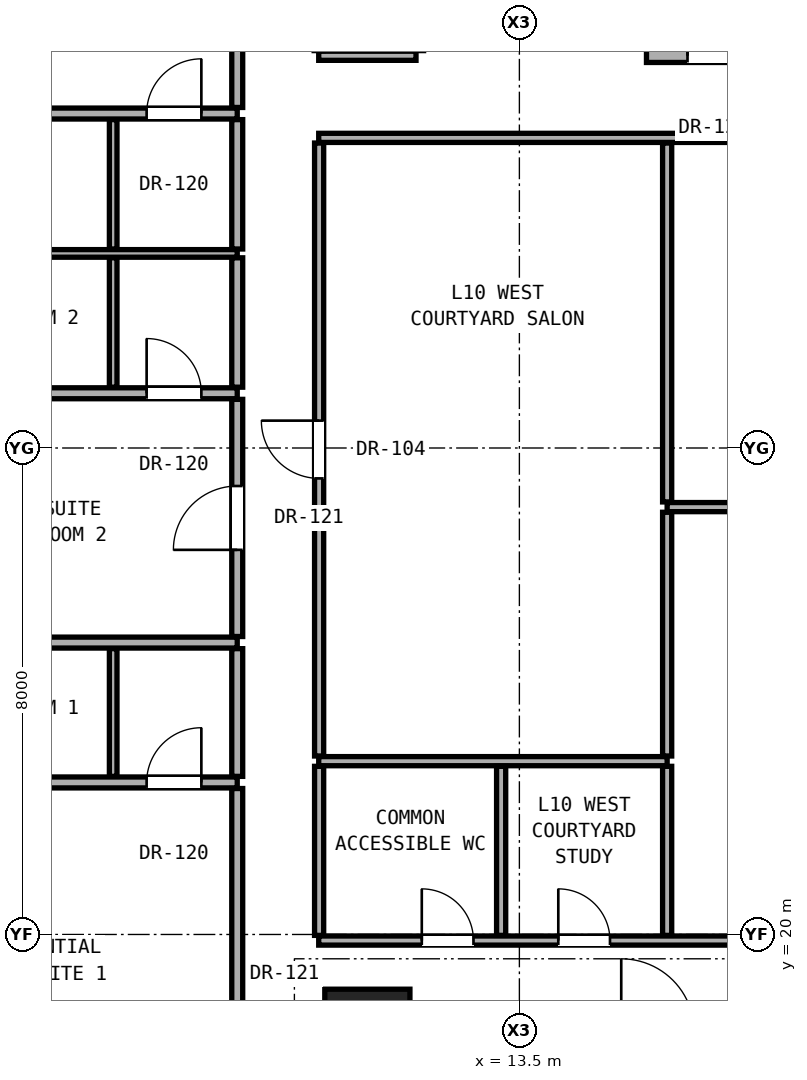
"""IFC4 building model, lengths in metres.
Left out: names, types, materials, properties, quantities, classifications, styles, units other than length and angle.
Written with IfcOpenShell. Run it as: python <this file> out.ifc"""

import sys

from ifc_helpers import new_model, si_unit, direction, frame, frame_2d, origin, origin_2d, place, context, subcontext, project, spatial, rectangle, extrude, element, fill, save


model = new_model("IFC4")
c1 = context("Model", 3, precision=1e-05, world=origin(), true_north=direction((0.0, 1.0)))
c2 = subcontext(c1, "Body", "Model", "MODEL_VIEW")
j1 = project(units=[si_unit("LENGTHUNIT", "METRE"), si_unit("PLANEANGLEUNIT", "RADIAN")], contexts=[c1])
p1 = place(None, origin())
s1 = spatial("IfcSite", under=j1, at=p1, CompositionType="ELEMENT")
p2 = place(p1, origin())
s2 = spatial("IfcBuilding", under=s1, at=p2, CompositionType="ELEMENT")
p3 = place(p2, frame((0.0, 0.0, 38.9)))
s3 = spatial("IfcBuildingStorey", under=s2, at=p3, CompositionType="ELEMENT", Elevation=38.9)
p4 = place(p3, frame((11.0, 18.4, 0.0), z_axis=(0.0, 0.0, 1.0), x_axis=(1.0, 0.0, 0.0)))
e1 = element("IfcColumn", 1, at=p4, inside=s3, PredefinedType="COLUMN", context=c2, shape_type="SweptSolid", body=[
    extrude(rectangle(XDim=1.4, YDim=1.4, at=origin_2d()), origin(), (0.0, 0.0, 1.0), 3.3),
])
p5 = place(p3, frame((10.2, 19.9, 0.0), z_axis=(0.0, 0.0, 1.0), x_axis=(1.0, 0.0, 0.0)))
e2 = element("IfcWall", 2, at=p5, inside=s3, PredefinedType="PARTITIONING", context=c2, shape_type="SweptSolid", body=[
    extrude(rectangle(XDim=20.6, YDim=0.15, at=frame_2d((10.3, 0.0))), origin(), (0.0, 0.0, 1.0), 2.104),
])
p6 = place(p5, frame((1.695, 0.0, 0.0)))
e3 = element("IfcOpeningElement", 3, at=p6, cuts=e2, PredefinedType="OPENING", context=c2, shape_type="SweptSolid", body=[
    extrude(rectangle(XDim=0.85, YDim=2.01, at=frame_2d((0.425, 1.005))), frame((0.0, 0.085, 0.0), z_axis=(0.0, -1.0, 0.0), x_axis=(1.0, 0.0, 0.0)), (0.0, 0.0, 1.0), 0.17),
])
p7 = place(p5, frame((3.94, 0.0, 0.0)))
e4 = element("IfcOpeningElement", 4, at=p7, cuts=e2, PredefinedType="OPENING", context=c2, shape_type="SweptSolid", body=[
    extrude(rectangle(XDim=0.85, YDim=2.01, at=frame_2d((0.425, 1.005))), frame((0.0, 0.085, 0.0), z_axis=(0.0, -1.0, 0.0), x_axis=(1.0, 0.0, 0.0)), (0.0, 0.0, 1.0), 0.17),
])
p8 = place(p5, frame((12.72, 0.0, 0.0)))
e5 = element("IfcOpeningElement", 5, at=p8, cuts=e2, PredefinedType="OPENING", context=c2, shape_type="SweptSolid", body=[
    extrude(rectangle(XDim=0.85, YDim=2.01, at=frame_2d((0.425, 1.005))), frame((0.0, 0.085, 0.0), z_axis=(0.0, -1.0, 0.0), x_axis=(1.0, 0.0, 0.0)), (0.0, 0.0, 1.0), 0.17),
])
p9 = place(p3, frame((-1.88, 22.5, 0.0), z_axis=(0.0, 0.0, 1.0), x_axis=(1.0, 0.0, 0.0)))
e6 = element("IfcWall", 6, at=p9, inside=s3, PredefinedType="PARTITIONING", context=c2, shape_type="SweptSolid", body=[
    extrude(rectangle(XDim=10.74, YDim=0.18, at=frame_2d((5.37, 0.0))), origin(), (0.0, 0.0, 1.0), 2.125),
])
p10 = place(p9, frame((3.945, 0.0, 0.0)))
e7 = element("IfcOpeningElement", 7, at=p10, cuts=e6, PredefinedType="OPENING", context=c2, shape_type="SweptSolid", body=[
    extrude(rectangle(XDim=0.85, YDim=2.01, at=frame_2d((0.425, 1.005))), frame((0.0, 0.1, 0.0), z_axis=(0.0, -1.0, 0.0), x_axis=(1.0, 0.0, 0.0)), (0.0, 0.0, 1.0), 0.2),
])
p11 = place(p9, frame((9.25, 0.0, 0.0)))
e8 = element("IfcOpeningElement", 8, at=p11, cuts=e6, PredefinedType="OPENING", context=c2, shape_type="SweptSolid", body=[
    extrude(rectangle(XDim=0.9, YDim=2.1, at=frame_2d((0.45, 1.05))), frame((0.0, 0.1, 0.0), z_axis=(0.0, -1.0, 0.0), x_axis=(1.0, 0.0, 0.0)), (0.0, 0.0, 1.0), 0.2),
])
p12 = place(p3, frame((10.2, 22.85, 0.0), z_axis=(0.0, 0.0, 1.0), x_axis=(1.0, 0.0, 0.0)))
e9 = element("IfcWall", 9, at=p12, inside=s3, PredefinedType="PARTITIONING", context=c2, shape_type="SweptSolid", body=[
    extrude(rectangle(XDim=5.73, YDim=0.15, at=frame_2d((2.865, 0.0))), origin(), (0.0, 0.0, 1.0), 2.104),
])
p13 = place(p3, frame((-1.88, 24.8, 0.0), z_axis=(0.0, 0.0, 1.0), x_axis=(1.0, 0.0, 0.0)))
e10 = element("IfcWall", 10, at=p13, inside=s3, PredefinedType="PARTITIONING", context=c2, shape_type="SweptSolid", body=[
    extrude(rectangle(XDim=10.74, YDim=0.18, at=frame_2d((5.37, 0.0))), origin(), (0.0, 0.0, 1.0), 2.125),
])
p14 = place(p3, frame((15.93, 27.028, 0.0), z_axis=(0.0, 0.0, 1.0), x_axis=(1.0, 0.0, 0.0)))
e11 = element("IfcWall", 11, at=p14, inside=s3, PredefinedType="PARTITIONING", context=c2, shape_type="SweptSolid", body=[
    extrude(rectangle(XDim=14.87, YDim=0.15, at=frame_2d((7.435, 0.0))), origin(), (0.0, 0.0, 1.0), 2.104),
])
p15 = place(p3, frame((-1.88, 28.9, 0.0), z_axis=(0.0, 0.0, 1.0), x_axis=(1.0, 0.0, 0.0)))
e12 = element("IfcWall", 12, at=p15, inside=s3, PredefinedType="PARTITIONING", context=c2, shape_type="SweptSolid", body=[
    extrude(rectangle(XDim=10.74, YDim=0.18, at=frame_2d((5.37, 0.0))), origin(), (0.0, 0.0, 1.0), 2.125),
])
p16 = place(p15, frame((3.945, 0.0, 0.0)))
e13 = element("IfcOpeningElement", 13, at=p16, cuts=e12, PredefinedType="OPENING", context=c2, shape_type="SweptSolid", body=[
    extrude(rectangle(XDim=0.85, YDim=2.01, at=frame_2d((0.425, 1.005))), frame((0.0, 0.1, 0.0), z_axis=(0.0, -1.0, 0.0), x_axis=(1.0, 0.0, 0.0)), (0.0, 0.0, 1.0), 0.2),
])
p17 = place(p15, frame((9.25, 0.0, 0.0)))
e14 = element("IfcOpeningElement", 14, at=p17, cuts=e12, PredefinedType="OPENING", context=c2, shape_type="SweptSolid", body=[
    extrude(rectangle(XDim=0.9, YDim=2.1, at=frame_2d((0.45, 1.05))), frame((0.0, 0.1, 0.0), z_axis=(0.0, -1.0, 0.0), x_axis=(1.0, 0.0, 0.0)), (0.0, 0.0, 1.0), 0.2),
])
p18 = place(p3, frame((-1.88, 31.2, 0.0), z_axis=(0.0, 0.0, 1.0), x_axis=(1.0, 0.0, 0.0)))
e15 = element("IfcWall", 15, at=p18, inside=s3, PredefinedType="PARTITIONING", context=c2, shape_type="SweptSolid", body=[
    extrude(rectangle(XDim=10.74, YDim=0.125, at=frame_2d((5.37, 0.0))), origin(), (0.0, 0.0, 1.0), 2.125),
])
p19 = place(p3, frame((10.2, 33.1, 0.0), z_axis=(0.0, 0.0, 1.0), x_axis=(1.0, 0.0, 0.0)))
e16 = element("IfcWall", 16, at=p19, inside=s3, PredefinedType="PARTITIONING", context=c2, shape_type="SweptSolid", body=[
    extrude(rectangle(XDim=20.6, YDim=0.15, at=frame_2d((10.3, 0.0))), origin(), (0.0, 0.0, 1.0), 2.104),
])
p20 = place(p19, frame((12.72, 0.0, 0.0)))
e17 = element("IfcOpeningElement", 17, at=p20, cuts=e16, PredefinedType="OPENING", context=c2, shape_type="SweptSolid", body=[
    extrude(rectangle(XDim=0.85, YDim=2.01, at=frame_2d((0.425, 1.005))), frame((0.0, 0.085, 0.0), z_axis=(0.0, -1.0, 0.0), x_axis=(1.0, 0.0, 0.0)), (0.0, 0.0, 1.0), 0.17),
])
p21 = place(p3, frame((-1.88, 33.5, 0.0), z_axis=(0.0, 0.0, 1.0), x_axis=(1.0, 0.0, 0.0)))
e18 = element("IfcWall", 18, at=p21, inside=s3, PredefinedType="PARTITIONING", context=c2, shape_type="SweptSolid", body=[
    extrude(rectangle(XDim=10.74, YDim=0.18, at=frame_2d((5.37, 0.0))), origin(), (0.0, 0.0, 1.0), 2.125),
])
p22 = place(p21, frame((3.945, 0.0, 0.0)))
e19 = element("IfcOpeningElement", 19, at=p22, cuts=e18, PredefinedType="OPENING", context=c2, shape_type="SweptSolid", body=[
    extrude(rectangle(XDim=0.85, YDim=2.01, at=frame_2d((0.425, 1.005))), frame((0.0, 0.1, 0.0), z_axis=(0.0, -1.0, 0.0), x_axis=(1.0, 0.0, 0.0)), (0.0, 0.0, 1.0), 0.2),
])
p23 = place(p21, frame((9.25, 0.0, 0.0)))
e20 = element("IfcOpeningElement", 20, at=p23, cuts=e18, PredefinedType="OPENING", context=c2, shape_type="SweptSolid", body=[
    extrude(rectangle(XDim=0.9, YDim=2.1, at=frame_2d((0.45, 1.05))), frame((0.0, 0.1, 0.0), z_axis=(0.0, -1.0, 0.0), x_axis=(1.0, 0.0, 0.0)), (0.0, 0.0, 1.0), 0.2),
])
p24 = place(p3, frame((10.2, 34.45, 0.0), z_axis=(0.0, 0.0, 1.0), x_axis=(1.0, 0.0, 0.0)))
e21 = element("IfcWall", 21, at=p24, inside=s3, PredefinedType="PARTITIONING", context=c2, shape_type="SweptSolid", body=[
    extrude(rectangle(XDim=1.6, YDim=0.15, at=frame_2d((0.8, 0.0))), origin(), (0.0, 0.0, 1.0), 2.104),
])
p25 = place(p3, frame((15.59, 34.45, 0.0), z_axis=(0.0, 0.0, 1.0), x_axis=(1.0, 0.0, 0.0)))
e22 = element("IfcWall", 22, at=p25, inside=s3, PredefinedType="SOLIDWALL", context=c2, shape_type="SweptSolid", body=[
    extrude(rectangle(XDim=15.21, YDim=0.22, at=frame_2d((7.605, 0.0))), origin(), (0.0, 0.0, 1.0), 2.104),
])
p26 = place(p25, frame((6.435, 0.0, 0.0)))
e23 = element("IfcOpeningElement", 23, at=p26, cuts=e22, PredefinedType="OPENING", context=c2, shape_type="SweptSolid", body=[
    extrude(rectangle(XDim=0.85, YDim=2.01, at=frame_2d((0.425, 1.005))), frame((0.0, 0.12, 0.0), z_axis=(0.0, -1.0, 0.0), x_axis=(1.0, 0.0, 0.0)), (0.0, 0.0, 1.0), 0.24),
])
p27 = place(p25, frame((11.135, 0.0, 0.0)))
e24 = element("IfcOpeningElement", 24, at=p27, cuts=e22, PredefinedType="OPENING", context=c2, shape_type="SweptSolid", body=[
    extrude(rectangle(XDim=0.85, YDim=2.01, at=frame_2d((0.425, 1.005))), frame((0.0, 0.12, 0.0), z_axis=(0.0, -1.0, 0.0), x_axis=(1.0, 0.0, 0.0)), (0.0, 0.0, 1.0), 0.24),
])
p28 = place(p25, frame((0.675, 0.0, 0.0)))
e25 = element("IfcOpeningElement", 25, at=p28, cuts=e22, PredefinedType="OPENING", context=c2, shape_type="SweptSolid", body=[
    extrude(rectangle(XDim=0.85, YDim=2.01, at=frame_2d((0.425, 1.005))), frame((0.0, 0.12, 0.0), z_axis=(0.0, -1.0, 0.0), x_axis=(1.0, 0.0, 0.0)), (0.0, 0.0, 1.0), 0.24),
])
p29 = place(p25, frame((2.835, 0.0, 0.0)))
e26 = element("IfcOpeningElement", 26, at=p29, cuts=e22, PredefinedType="OPENING", context=c2, shape_type="SweptSolid", body=[
    extrude(rectangle(XDim=0.85, YDim=2.01, at=frame_2d((0.425, 1.005))), frame((0.0, 0.12, 0.0), z_axis=(0.0, -1.0, 0.0), x_axis=(1.0, 0.0, 0.0)), (0.0, 0.0, 1.0), 0.24),
])
p30 = place(p3, frame((6.82, 22.6, 0.0), z_axis=(0.0, 0.0, 1.0), x_axis=(0.0, 1.0, 0.0)))
e27 = element("IfcWall", 27, at=p30, inside=s3, PredefinedType="PARTITIONING", context=c2, shape_type="SweptSolid", body=[
    extrude(rectangle(XDim=2.1, YDim=0.125, at=frame_2d((1.05, 0.0))), origin(), (0.0, 0.0, 1.0), 2.279),
])
for number, where, z_axis, x_axis in (
    (28, (6.82, 29.0, 0.0), (0.0, 0.0, 1.0), (0.0, 1.0, 0.0)),
    (29, (6.82, 31.272, 0.0), (0.0, 0.0, 1.0), (0.0, 1.0, 0.0)),
):
    element("IfcWall", number, at=place(p3, frame(where, z_axis=z_axis, x_axis=x_axis)), inside=s3, PredefinedType="PARTITIONING", context=c2, shape_type="SweptSolid", body=[
        extrude(rectangle(XDim=2.127, YDim=0.125, at=frame_2d((1.064, 0.0))), origin(), (0.0, 0.0, 1.0), 2.279),
    ])
p31 = place(p3, frame((8.86, 14.01, 0.0), z_axis=(0.0, 0.0, 1.0), x_axis=(0.0, 1.0, 0.0)))
e30 = element("IfcWall", 30, at=p31, inside=s3, PredefinedType="PARTITIONING", context=c2, shape_type="SweptSolid", body=[
    extrude(rectangle(XDim=8.39, YDim=0.18, at=frame_2d((4.195, 0.0))), origin(), (0.0, 0.0, 1.0), 2.436),
])
p32 = place(p31, frame((3.67, 0.0, 0.0)))
e31 = element("IfcOpeningElement", 31, at=p32, cuts=e30, PredefinedType="OPENING", context=c2, shape_type="SweptSolid", body=[
    extrude(rectangle(XDim=1.05, YDim=2.2, at=frame_2d((0.525, 1.1))), frame((0.0, 0.1, 0.0), z_axis=(0.0, -1.0, 0.0), x_axis=(1.0, 0.0, 0.0)), (0.0, 0.0, 1.0), 0.2),
])
p33 = place(p3, frame((8.86, 22.6, 0.0), z_axis=(0.0, 0.0, 1.0), x_axis=(0.0, 1.0, 0.0)))
e32 = element("IfcWall", 32, at=p33, inside=s3, PredefinedType="PARTITIONING", context=c2, shape_type="SweptSolid", body=[
    extrude(rectangle(XDim=2.1, YDim=0.18, at=frame_2d((1.05, 0.0))), origin(), (0.0, 0.0, 1.0), 2.279),
])
p34 = place(p3, frame((8.86, 24.9, 0.0), z_axis=(0.0, 0.0, 1.0), x_axis=(0.0, 1.0, 0.0)))
e33 = element("IfcWall", 33, at=p34, inside=s3, PredefinedType="PARTITIONING", context=c2, shape_type="SweptSolid", body=[
    extrude(rectangle(XDim=3.9, YDim=0.18, at=frame_2d((1.95, 0.0))), origin(), (0.0, 0.0, 1.0), 2.279),
])
p35 = place(p34, frame((1.425, 0.0, 0.0)))
e34 = element("IfcOpeningElement", 34, at=p35, cuts=e33, PredefinedType="OPENING", context=c2, shape_type="SweptSolid", body=[
    extrude(rectangle(XDim=1.05, YDim=2.2, at=frame_2d((0.525, 1.1))), frame((0.0, 0.1, 0.0), z_axis=(0.0, -1.0, 0.0), x_axis=(1.0, 0.0, 0.0)), (0.0, 0.0, 1.0), 0.2),
])
for number, where, z_axis, x_axis in (
    (35, (8.86, 29.0, 0.0), (0.0, 0.0, 1.0), (0.0, 1.0, 0.0)),
    (36, (8.86, 31.272, 0.0), (0.0, 0.0, 1.0), (0.0, 1.0, 0.0)),
):
    element("IfcWall", number, at=place(p3, frame(where, z_axis=z_axis, x_axis=x_axis)), inside=s3, PredefinedType="PARTITIONING", context=c2, shape_type="SweptSolid", body=[
        extrude(rectangle(XDim=2.127, YDim=0.18, at=frame_2d((1.064, 0.0))), origin(), (0.0, 0.0, 1.0), 2.279),
    ])
p36 = place(p3, frame((8.86, 33.6, 0.0), z_axis=(0.0, 0.0, 1.0), x_axis=(0.0, 1.0, 0.0)))
e37 = element("IfcWall", 37, at=p36, inside=s3, PredefinedType="PARTITIONING", context=c2, shape_type="SweptSolid", body=[
    extrude(rectangle(XDim=8.39, YDim=0.18, at=frame_2d((4.195, 0.0))), origin(), (0.0, 0.0, 1.0), 2.436),
])
p37 = place(p36, frame((3.67, 0.0, 0.0)))
e38 = element("IfcOpeningElement", 38, at=p37, cuts=e37, PredefinedType="OPENING", context=c2, shape_type="SweptSolid", body=[
    extrude(rectangle(XDim=1.05, YDim=2.2, at=frame_2d((0.525, 1.1))), frame((0.0, 0.1, 0.0), z_axis=(0.0, -1.0, 0.0), x_axis=(1.0, 0.0, 0.0)), (0.0, 0.0, 1.0), 0.2),
])
p38 = place(p3, frame((10.207, 19.985, 0.0), z_axis=(0.0, 0.0, 1.0), x_axis=(0.0, 1.0, 0.0)))
e39 = element("IfcWall", 39, at=p38, inside=s3, PredefinedType="PARTITIONING", context=c2, shape_type="SweptSolid", body=[
    extrude(rectangle(XDim=2.78, YDim=0.15, at=frame_2d((1.39, 0.0))), origin(), (0.0, 0.0, 1.0), 3.06),
])
p39 = place(p3, frame((10.207, 22.935, 0.0), z_axis=(0.0, 0.0, 1.0), x_axis=(0.0, 1.0, 0.0)))
e40 = element("IfcWall", 40, at=p39, inside=s3, PredefinedType="PARTITIONING", context=c2, shape_type="SweptSolid", body=[
    extrude(rectangle(XDim=10.08, YDim=0.15, at=frame_2d((5.04, 0.0))), origin(), (0.0, 0.0, 1.0), 2.279),
])
p40 = place(p39, frame((4.565, 0.0, 0.0)))
e41 = element("IfcOpeningElement", 41, at=p40, cuts=e40, PredefinedType="OPENING", context=c2, shape_type="SweptSolid", body=[
    extrude(rectangle(XDim=0.95, YDim=2.15, at=frame_2d((0.475, 1.075))), frame((0.0, 0.085, 0.0), z_axis=(0.0, -1.0, 0.0), x_axis=(1.0, 0.0, 0.0)), (0.0, 0.0, 1.0), 0.17),
])
p41 = place(p3, frame((13.2, 19.985, 0.0), z_axis=(0.0, 0.0, 1.0), x_axis=(0.0, 1.0, 0.0)))
e42 = element("IfcWall", 42, at=p41, inside=s3, PredefinedType="PARTITIONING", context=c2, shape_type="SweptSolid", body=[
    extrude(rectangle(XDim=2.78, YDim=0.15, at=frame_2d((1.39, 0.0))), origin(), (0.0, 0.0, 1.0), 3.06),
])
p42 = place(p3, frame((15.93, 19.985, 0.0), z_axis=(0.0, 0.0, 1.0), x_axis=(0.0, 1.0, 0.0)))
e43 = element("IfcWall", 43, at=p42, inside=s3, PredefinedType="PARTITIONING", context=c2, shape_type="SweptSolid", body=[
    extrude(rectangle(XDim=2.78, YDim=0.15, at=frame_2d((1.39, 0.0))), origin(), (0.0, 0.0, 1.0), 2.589),
])
p43 = place(p3, frame((15.93, 22.935, 0.0), z_axis=(0.0, 0.0, 1.0), x_axis=(0.0, 1.0, 0.0)))
e44 = element("IfcWall", 44, at=p43, inside=s3, PredefinedType="PARTITIONING", context=c2, shape_type="SweptSolid", body=[
    extrude(rectangle(XDim=4.008, YDim=0.15, at=frame_2d((2.004, 0.0))), origin(), (0.0, 0.0, 1.0), 2.104),
])
p44 = place(p3, frame((15.93, 27.113, 0.0), z_axis=(0.0, 0.0, 1.0), x_axis=(0.0, 1.0, 0.0)))
e45 = element("IfcWall", 45, at=p44, inside=s3, PredefinedType="PARTITIONING", context=c2, shape_type="SweptSolid", body=[
    extrude(rectangle(XDim=5.902, YDim=0.15, at=frame_2d((2.951, 0.0))), origin(), (0.0, 0.0, 1.0), 2.104),
])
p45 = place(p28, origin())
e46 = element("IfcDoor", 46, at=p45, inside=s3, OperationType="SINGLE_SWING_LEFT", PredefinedType="DOOR", context=c2, shape_type="SweptSolid", body=[
    extrude(rectangle(XDim=0.85, YDim=2.01, at=frame_2d((0.425, 1.005))), frame((0.0, 0.025, 0.0), z_axis=(0.0, -1.0, 0.0), x_axis=(1.0, 0.0, 0.0)), (0.0, 0.0, 1.0), 0.05),
])
fill(e25, e46)
p46 = place(p6, origin())
e47 = element("IfcDoor", 47, at=p46, inside=s3, OperationType="SINGLE_SWING_LEFT", PredefinedType="DOOR", context=c2, shape_type="SweptSolid", body=[
    extrude(rectangle(XDim=0.85, YDim=2.01, at=frame_2d((0.425, 1.005))), frame((0.0, 0.025, 0.0), z_axis=(0.0, -1.0, 0.0), x_axis=(1.0, 0.0, 0.0)), (0.0, 0.0, 1.0), 0.05),
])
fill(e3, e47)
p47 = place(p11, origin())
e48 = element("IfcDoor", 48, at=p47, inside=s3, OperationType="SINGLE_SWING_RIGHT", PredefinedType="DOOR", context=c2, shape_type="SweptSolid", body=[
    extrude(rectangle(XDim=0.9, YDim=2.1, at=frame_2d((0.45, 1.05))), frame((0.0, 0.025, 0.0), z_axis=(0.0, -1.0, 0.0), x_axis=(1.0, 0.0, 0.0)), (0.0, 0.0, 1.0), 0.05),
])
fill(e8, e48)
p48 = place(p35, origin())
e49 = element("IfcDoor", 49, at=p48, inside=s3, OperationType="SINGLE_SWING_LEFT", PredefinedType="DOOR", context=c2, shape_type="SweptSolid", body=[
    extrude(rectangle(XDim=1.05, YDim=2.2, at=frame_2d((0.525, 1.1))), frame((0.0, 0.025, 0.0), z_axis=(0.0, -1.0, 0.0), x_axis=(1.0, 0.0, 0.0)), (0.0, 0.0, 1.0), 0.05),
])
fill(e34, e49)
p49 = place(p17, origin())
e50 = element("IfcDoor", 50, at=p49, inside=s3, OperationType="SINGLE_SWING_LEFT", PredefinedType="DOOR", context=c2, shape_type="SweptSolid", body=[
    extrude(rectangle(XDim=0.9, YDim=2.1, at=frame_2d((0.45, 1.05))), frame((0.0, 0.025, 0.0), z_axis=(0.0, -1.0, 0.0), x_axis=(1.0, 0.0, 0.0)), (0.0, 0.0, 1.0), 0.05),
])
fill(e14, e50)
p50 = place(p23, origin())
e51 = element("IfcDoor", 51, at=p50, inside=s3, OperationType="SINGLE_SWING_RIGHT", PredefinedType="DOOR", context=c2, shape_type="SweptSolid", body=[
    extrude(rectangle(XDim=0.9, YDim=2.1, at=frame_2d((0.45, 1.05))), frame((0.0, 0.025, 0.0), z_axis=(0.0, -1.0, 0.0), x_axis=(1.0, 0.0, 0.0)), (0.0, 0.0, 1.0), 0.05),
])
fill(e20, e51)
p51 = place(p7, origin())
e52 = element("IfcDoor", 52, at=p51, inside=s3, OperationType="SINGLE_SWING_LEFT", PredefinedType="DOOR", context=c2, shape_type="SweptSolid", body=[
    extrude(rectangle(XDim=0.85, YDim=2.01, at=frame_2d((0.425, 1.005))), frame((0.0, 0.025, 0.0), z_axis=(0.0, -1.0, 0.0), x_axis=(1.0, 0.0, 0.0)), (0.0, 0.0, 1.0), 0.05),
])
fill(e4, e52)
p52 = place(p40, origin())
e53 = element("IfcDoor", 53, at=p52, inside=s3, OperationType="SINGLE_SWING_RIGHT", PredefinedType="DOOR", context=c2, shape_type="SweptSolid", body=[
    extrude(rectangle(XDim=0.95, YDim=2.15, at=frame_2d((0.475, 1.075))), frame((0.0, 0.025, 0.0), z_axis=(0.0, -1.0, 0.0), x_axis=(1.0, 0.0, 0.0)), (0.0, 0.0, 1.0), 0.05),
])
fill(e41, e53)
save(model, sys.argv[1])
